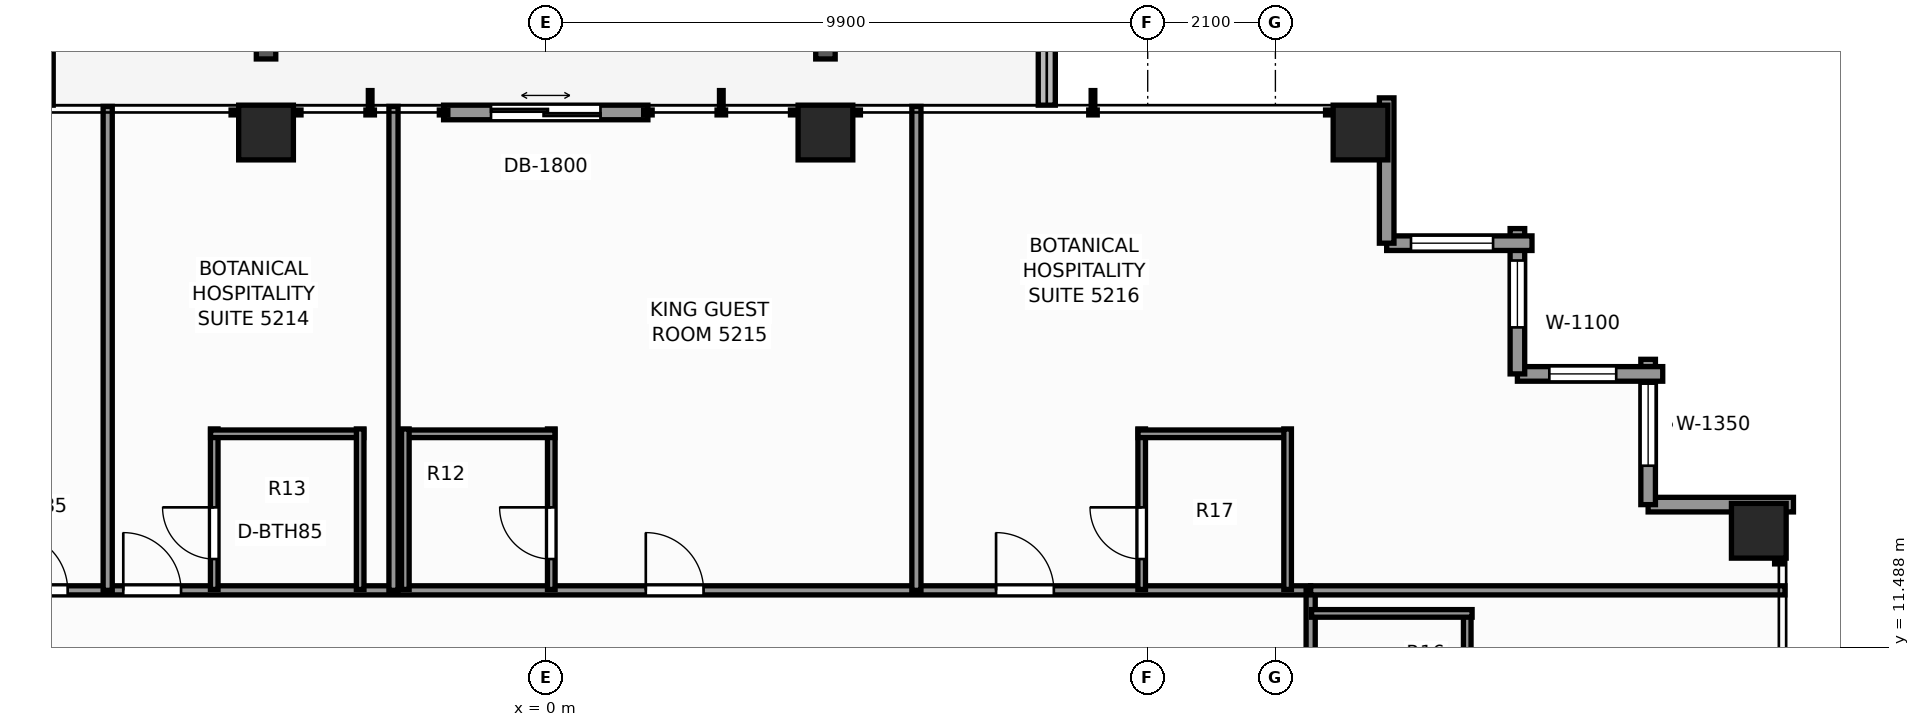
"""IFC4 building model, lengths in metres.
Left out: names, types, materials, properties, quantities, classifications, styles, units other than length and angle.
Written with IfcOpenShell. Run it as: python <this file> out.ifc"""

import sys

from ifc_helpers import new_model, si_unit, direction, frame, frame_2d, origin, origin_2d, place, context, subcontext, project, spatial, rectangle, extrude, element, fill, save


model = new_model("IFC4")
c1 = context("Model", 3, precision=1e-05, world=origin(), true_north=direction((0.0, 1.0)))
c2 = subcontext(c1, "Body", "Model", "MODEL_VIEW")
j1 = project(units=[si_unit("LENGTHUNIT", "METRE"), si_unit("PLANEANGLEUNIT", "RADIAN")], contexts=[c1])
p1 = place(None, origin())
s1 = spatial("IfcSite", under=j1, at=p1, CompositionType="ELEMENT")
p2 = place(p1, origin())
s2 = spatial("IfcBuilding", under=s1, at=p2, CompositionType="ELEMENT")
p3 = place(p2, frame((0.0, 0.0, 180.0)))
s3 = spatial("IfcBuildingStorey", under=s2, at=p3, CompositionType="ELEMENT", Elevation=180.0)
for number, where, z_axis, x_axis in (
    (1, (-4.6, 19.95, 0.0), (0.0, 0.0, 1.0), (1.0, 0.0, 0.0)),
    (2, (4.6, 19.95, 0.0), (0.0, 0.0, 1.0), (1.0, 0.0, 0.0)),
    (3, (13.4, 19.95, 0.0), (0.0, 0.0, 1.0), (1.0, 0.0, 0.0)),
    (4, (19.95, 13.4, 0.0), (0.0, 0.0, 1.0), (1.0, 0.0, 0.0)),
):
    element("IfcColumn", number, at=place(p3, frame(where, z_axis=z_axis, x_axis=x_axis)), inside=s3, PredefinedType="COLUMN", context=c2, shape_type="SweptSolid", body=[
        extrude(rectangle(XDim=0.9, YDim=0.9, at=origin_2d()), origin(), (0.0, 0.0, 1.0), 3.3),
    ])
p4 = place(p3, frame((8.24, 20.4, -0.04), z_axis=(0.0, 0.0, 1.0), x_axis=(0.0, 1.0, 0.0)))
e5 = element("IfcWall", 5, at=p4, inside=s3, PredefinedType="PARAPET", context=c2, shape_type="SweptSolid", body=[
    extrude(rectangle(XDim=3.42, YDim=0.28, at=frame_2d((1.71, 0.0))), origin(), (0.0, 0.0, 1.0), 0.42),
])
p5 = place(p3, frame((-8.24, 23.375, -0.04), z_axis=(0.0, 0.0, 1.0), x_axis=(0.0, -1.0, 0.0)))
e6 = element("IfcWall", 6, at=p5, inside=s3, PredefinedType="PARAPET", context=c2, shape_type="SweptSolid", body=[
    extrude(rectangle(XDim=2.975, YDim=0.28, at=frame_2d((1.487, 0.0))), origin(), (0.0, 0.0, 1.0), 0.42),
])
p6 = place(p3, frame((18.13, 13.83, 0.0), z_axis=(0.0, 0.0, 1.0), x_axis=(1.0, 0.0, 0.0)))
e7 = element("IfcWall", 7, at=p6, inside=s3, PredefinedType="STANDARD", context=c2, shape_type="SweptSolid", body=[
    extrude(rectangle(XDim=2.39, YDim=0.24, at=frame_2d((1.195, 0.0))), origin(), (0.0, 0.0, 1.0), 2.463),
])
p7 = place(p3, frame((18.13, 16.22, 0.0), z_axis=(0.0, 0.0, 1.0), x_axis=(0.0, -1.0, 0.0)))
e8 = element("IfcWall", 8, at=p7, inside=s3, PredefinedType="STANDARD", context=c2, shape_type="SweptSolid", body=[
    extrude(rectangle(XDim=2.39, YDim=0.24, at=frame_2d((1.195, 0.0))), origin(), (0.0, 0.0, 1.0), 2.463),
])
p8 = place(p7, frame((0.4, 0.0, 0.65)))
e9 = element("IfcOpeningElement", 9, at=p8, cuts=e8, PredefinedType="OPENING", context=c2, shape_type="SweptSolid", body=[
    extrude(rectangle(XDim=1.35, YDim=1.55, at=frame_2d((0.675, 0.775))), frame((0.0, 0.13, 0.0), z_axis=(0.0, -1.0, 0.0), x_axis=(1.0, 0.0, 0.0)), (0.0, 0.0, 1.0), 0.26),
])
p9 = place(p3, frame((15.98, 15.98, 0.0), z_axis=(0.0, 0.0, 1.0), x_axis=(1.0, 0.0, 0.0)))
e10 = element("IfcWall", 10, at=p9, inside=s3, PredefinedType="STANDARD", context=c2, shape_type="SweptSolid", body=[
    extrude(rectangle(XDim=2.39, YDim=0.24, at=frame_2d((1.195, 0.0))), origin(), (0.0, 0.0, 1.0), 2.463),
])
p10 = place(p9, frame((0.525, 0.0, 0.65)))
e11 = element("IfcOpeningElement", 11, at=p10, cuts=e10, PredefinedType="OPENING", context=c2, shape_type="SweptSolid", body=[
    extrude(rectangle(XDim=1.1, YDim=1.45, at=frame_2d((0.55, 0.725))), frame((0.0, 0.13, 0.0), z_axis=(0.0, -1.0, 0.0), x_axis=(1.0, 0.0, 0.0)), (0.0, 0.0, 1.0), 0.26),
])
p11 = place(p3, frame((15.98, 18.37, 0.0), z_axis=(0.0, 0.0, 1.0), x_axis=(0.0, -1.0, 0.0)))
e12 = element("IfcWall", 12, at=p11, inside=s3, PredefinedType="STANDARD", context=c2, shape_type="SweptSolid", body=[
    extrude(rectangle(XDim=2.39, YDim=0.24, at=frame_2d((1.195, 0.0))), origin(), (0.0, 0.0, 1.0), 2.463),
])
p12 = place(p11, frame((0.525, 0.0, 0.65)))
e13 = element("IfcOpeningElement", 13, at=p12, cuts=e12, PredefinedType="OPENING", context=c2, shape_type="SweptSolid", body=[
    extrude(rectangle(XDim=1.1, YDim=1.45, at=frame_2d((0.55, 0.725))), frame((0.0, 0.13, 0.0), z_axis=(0.0, -1.0, 0.0), x_axis=(1.0, 0.0, 0.0)), (0.0, 0.0, 1.0), 0.26),
])
p13 = place(p3, frame((13.83, 18.13, 0.0), z_axis=(0.0, 0.0, 1.0), x_axis=(1.0, 0.0, 0.0)))
e14 = element("IfcWall", 14, at=p13, inside=s3, PredefinedType="STANDARD", context=c2, shape_type="SweptSolid", body=[
    extrude(rectangle(XDim=2.39, YDim=0.24, at=frame_2d((1.195, 0.0))), origin(), (0.0, 0.0, 1.0), 2.463),
])
p14 = place(p13, frame((0.4, 0.0, 0.65)))
e15 = element("IfcOpeningElement", 15, at=p14, cuts=e14, PredefinedType="OPENING", context=c2, shape_type="SweptSolid", body=[
    extrude(rectangle(XDim=1.35, YDim=1.55, at=frame_2d((0.675, 0.775))), frame((0.0, 0.13, 0.0), z_axis=(0.0, -1.0, 0.0), x_axis=(1.0, 0.0, 0.0)), (0.0, 0.0, 1.0), 0.26),
])
p15 = place(p3, frame((13.83, 20.52, 0.0), z_axis=(0.0, 0.0, 1.0), x_axis=(0.0, -1.0, 0.0)))
e16 = element("IfcWall", 16, at=p15, inside=s3, PredefinedType="STANDARD", context=c2, shape_type="SweptSolid", body=[
    extrude(rectangle(XDim=2.39, YDim=0.24, at=frame_2d((1.195, 0.0))), origin(), (0.0, 0.0, 1.0), 2.463),
])
p16 = place(p3, frame((-1.68, 20.28, 0.0), z_axis=(0.0, 0.0, 1.0), x_axis=(1.0, 0.0, 0.0)))
e17 = element("IfcWall", 17, at=p16, inside=s3, PredefinedType="STANDARD", context=c2, shape_type="SweptSolid", body=[
    extrude(rectangle(XDim=3.36, YDim=0.24, at=frame_2d((1.68, 0.0))), origin(), (0.0, 0.0, 1.0), 3.08),
])
p17 = place(p16, frame((0.78, 0.0, 0.0)))
e18 = element("IfcOpeningElement", 18, at=p17, cuts=e17, PredefinedType="OPENING", context=c2, shape_type="SweptSolid", body=[
    extrude(rectangle(XDim=1.8, YDim=2.2, at=frame_2d((0.9, 1.1))), frame((0.0, 0.13, 0.0), z_axis=(0.0, -1.0, 0.0), x_axis=(1.0, 0.0, 0.0)), (0.0, 0.0, 1.0), 0.26),
])
p18 = place(p3, frame((-12.26, 12.42, 0.0), z_axis=(0.0, 0.0, 1.0), x_axis=(1.0, 0.0, 0.0)))
e19 = element("IfcWall", 19, at=p18, inside=s3, PredefinedType="PARTITIONING", context=c2, shape_type="SweptSolid", body=[
    extrude(rectangle(XDim=24.84, YDim=0.15, at=frame_2d((12.42, 0.0))), origin(), (0.0, 0.0, 1.0), 2.369),
])
p19 = place(p18, frame((3.448, 0.0, 0.0)))
e20 = element("IfcOpeningElement", 20, at=p19, cuts=e19, PredefinedType="OPENING", context=c2, shape_type="SweptSolid", body=[
    extrude(rectangle(XDim=0.95, YDim=2.06, at=frame_2d((0.475, 1.03))), frame((0.0, 0.085, 0.0), z_axis=(0.0, -1.0, 0.0), x_axis=(1.0, 0.0, 0.0)), (0.0, 0.0, 1.0), 0.17),
])
p20 = place(p18, frame((5.312, 0.0, 0.0)))
e21 = element("IfcOpeningElement", 21, at=p20, cuts=e19, PredefinedType="OPENING", context=c2, shape_type="SweptSolid", body=[
    extrude(rectangle(XDim=0.95, YDim=2.06, at=frame_2d((0.475, 1.03))), frame((0.0, 0.085, 0.0), z_axis=(0.0, -1.0, 0.0), x_axis=(1.0, 0.0, 0.0)), (0.0, 0.0, 1.0), 0.17),
])
p21 = place(p18, frame((13.906, 0.0, 0.0)))
e22 = element("IfcOpeningElement", 22, at=p21, cuts=e19, PredefinedType="OPENING", context=c2, shape_type="SweptSolid", body=[
    extrude(rectangle(XDim=0.95, YDim=2.06, at=frame_2d((0.475, 1.03))), frame((0.0, 0.085, 0.0), z_axis=(0.0, -1.0, 0.0), x_axis=(1.0, 0.0, 0.0)), (0.0, 0.0, 1.0), 0.17),
])
p22 = place(p18, frame((19.666, 0.0, 0.0)))
e23 = element("IfcOpeningElement", 23, at=p22, cuts=e19, PredefinedType="OPENING", context=c2, shape_type="SweptSolid", body=[
    extrude(rectangle(XDim=0.95, YDim=2.06, at=frame_2d((0.475, 1.03))), frame((0.0, 0.085, 0.0), z_axis=(0.0, -1.0, 0.0), x_axis=(1.0, 0.0, 0.0)), (0.0, 0.0, 1.0), 0.17),
])
p23 = place(p3, frame((12.58, -12.42, 0.0), z_axis=(0.0, 0.0, 1.0), x_axis=(0.0, 1.0, 0.0)))
e24 = element("IfcWall", 24, at=p23, inside=s3, PredefinedType="PARTITIONING", context=c2, shape_type="SweptSolid", body=[
    extrude(rectangle(XDim=24.84, YDim=0.15, at=frame_2d((12.42, 0.0))), origin(), (0.0, 0.0, 1.0), 2.369),
])
p24 = place(p23, frame((3.024, 0.0, 0.0)))
e25 = element("IfcOpeningElement", 25, at=p24, cuts=e24, PredefinedType="OPENING", context=c2, shape_type="SweptSolid", body=[
    extrude(rectangle(XDim=0.9, YDim=2.06, at=frame_2d((0.45, 1.03))), frame((0.0, 0.085, 0.0), z_axis=(0.0, -1.0, 0.0), x_axis=(1.0, 0.0, 0.0)), (0.0, 0.0, 1.0), 0.17),
])
p25 = place(p23, frame((5.359, 0.0, 0.0)))
e26 = element("IfcOpeningElement", 26, at=p25, cuts=e24, PredefinedType="OPENING", context=c2, shape_type="SweptSolid", body=[
    extrude(rectangle(XDim=0.9, YDim=2.06, at=frame_2d((0.45, 1.03))), frame((0.0, 0.085, 0.0), z_axis=(0.0, -1.0, 0.0), x_axis=(1.0, 0.0, 0.0)), (0.0, 0.0, 1.0), 0.17),
])
p26 = place(p23, frame((11.067, 0.0, 0.0)))
e27 = element("IfcOpeningElement", 27, at=p26, cuts=e24, PredefinedType="OPENING", context=c2, shape_type="SweptSolid", body=[
    extrude(rectangle(XDim=0.95, YDim=2.06, at=frame_2d((0.475, 1.03))), frame((0.0, 0.085, 0.0), z_axis=(0.0, -1.0, 0.0), x_axis=(1.0, 0.0, 0.0)), (0.0, 0.0, 1.0), 0.17),
])
p27 = place(p23, frame((18.038, 0.0, 0.0)))
e28 = element("IfcOpeningElement", 28, at=p27, cuts=e24, PredefinedType="OPENING", context=c2, shape_type="SweptSolid", body=[
    extrude(rectangle(XDim=0.95, YDim=2.06, at=frame_2d((0.475, 1.03))), frame((0.0, 0.085, 0.0), z_axis=(0.0, -1.0, 0.0), x_axis=(1.0, 0.0, 0.0)), (0.0, 0.0, 1.0), 0.17),
])
p28 = place(p23, frame((20.184, 0.0, 0.0)))
e29 = element("IfcOpeningElement", 29, at=p28, cuts=e24, PredefinedType="OPENING", context=c2, shape_type="SweptSolid", body=[
    extrude(rectangle(XDim=0.95, YDim=2.06, at=frame_2d((0.475, 1.03))), frame((0.0, 0.085, 0.0), z_axis=(0.0, -1.0, 0.0), x_axis=(1.0, 0.0, 0.0)), (0.0, 0.0, 1.0), 0.17),
])
p29 = place(p3, frame((12.58, 12.42, 0.0), z_axis=(0.0, 0.0, 1.0), x_axis=(1.0, 0.0, 0.0)))
e30 = element("IfcWall", 30, at=p29, inside=s3, PredefinedType="PARTITIONING", context=c2, shape_type="SweptSolid", body=[
    extrude(rectangle(XDim=7.8, YDim=0.15, at=frame_2d((3.9, 0.0))), origin(), (0.0, 0.0, 1.0), 2.369),
])
p30 = place(p3, frame((15.155, 9.581, 0.0), z_axis=(0.0, 0.0, 1.0), x_axis=(0.0, 1.0, 0.0)))
e31 = element("IfcWall", 31, at=p30, inside=s3, PredefinedType="PARTITIONING", context=c2, shape_type="SweptSolid", body=[
    extrude(rectangle(XDim=2.52, YDim=0.125, at=frame_2d((1.26, 0.0))), origin(), (0.0, 0.0, 1.0), 2.369),
])
p31 = place(p3, frame((12.595, 12.041, 0.0), z_axis=(0.0, 0.0, 1.0), x_axis=(1.0, 0.0, 0.0)))
e32 = element("IfcWall", 32, at=p31, inside=s3, PredefinedType="PARTITIONING", context=c2, shape_type="SweptSolid", body=[
    extrude(rectangle(XDim=2.64, YDim=0.125, at=frame_2d((1.32, 0.0))), origin(), (0.0, 0.0, 1.0), 3.08),
])
for number, where, z_axis, x_axis in (
    (33, (-7.204, 12.42, 0.0), (0.0, 0.0, 1.0), (0.0, 1.0, 0.0)),
    (34, (-2.504, 12.42, 0.0), (0.0, 0.0, 1.0), (0.0, 1.0, 0.0)),
):
    element("IfcWall", number, at=place(p3, frame(where, z_axis=z_axis, x_axis=x_axis)), inside=s3, PredefinedType="PARTITIONING", context=c2, shape_type="SweptSolid", body=[
        extrude(rectangle(XDim=7.96, YDim=0.15, at=frame_2d((3.98, 0.0))), origin(), (0.0, 0.0, 1.0), 2.453),
    ])
p32 = place(p3, frame((-5.452, 12.435, 0.0), z_axis=(0.0, 0.0, 1.0), x_axis=(0.0, 1.0, 0.0)))
e35 = element("IfcWall", 35, at=p32, inside=s3, PredefinedType="PARTITIONING", context=c2, shape_type="SweptSolid", body=[
    extrude(rectangle(XDim=2.64, YDim=0.125, at=frame_2d((1.32, 0.0))), origin(), (0.0, 0.0, 1.0), 3.08),
])
p33 = place(p32, frame((0.5, 0.0, 0.0)))
e36 = element("IfcOpeningElement", 36, at=p33, cuts=e35, PredefinedType="OPENING", context=c2, shape_type="SweptSolid", body=[
    extrude(rectangle(XDim=0.85, YDim=2.03, at=frame_2d((0.425, 1.015))), frame((0.0, 0.073, 0.0), z_axis=(0.0, -1.0, 0.0), x_axis=(1.0, 0.0, 0.0)), (0.0, 0.0, 1.0), 0.145),
])
p34 = place(p3, frame((-5.512, 14.995, 0.0), z_axis=(0.0, 0.0, 1.0), x_axis=(1.0, 0.0, 0.0)))
e37 = element("IfcWall", 37, at=p34, inside=s3, PredefinedType="PARTITIONING", context=c2, shape_type="SweptSolid", body=[
    extrude(rectangle(XDim=2.52, YDim=0.125, at=frame_2d((1.26, 0.0))), origin(), (0.0, 0.0, 1.0), 2.369),
])
p35 = place(p3, frame((-3.052, 12.435, 0.0), z_axis=(0.0, 0.0, 1.0), x_axis=(0.0, 1.0, 0.0)))
e38 = element("IfcWall", 38, at=p35, inside=s3, PredefinedType="PARTITIONING", context=c2, shape_type="SweptSolid", body=[
    extrude(rectangle(XDim=2.64, YDim=0.125, at=frame_2d((1.32, 0.0))), origin(), (0.0, 0.0, 1.0), 3.08),
])
p36 = place(p3, frame((6.096, 12.42, 0.0), z_axis=(0.0, 0.0, 1.0), x_axis=(0.0, 1.0, 0.0)))
e39 = element("IfcWall", 39, at=p36, inside=s3, PredefinedType="PARTITIONING", context=c2, shape_type="SweptSolid", body=[
    extrude(rectangle(XDim=7.96, YDim=0.15, at=frame_2d((3.98, 0.0))), origin(), (0.0, 0.0, 1.0), 2.453),
])
p37 = place(p3, frame((0.091, 12.435, 0.0), z_axis=(0.0, 0.0, 1.0), x_axis=(0.0, 1.0, 0.0)))
e40 = element("IfcWall", 40, at=p37, inside=s3, PredefinedType="PARTITIONING", context=c2, shape_type="SweptSolid", body=[
    extrude(rectangle(XDim=2.64, YDim=0.125, at=frame_2d((1.32, 0.0))), origin(), (0.0, 0.0, 1.0), 2.605),
])
p38 = place(p37, frame((0.5, 0.0, 0.0)))
e41 = element("IfcOpeningElement", 41, at=p38, cuts=e40, PredefinedType="OPENING", context=c2, shape_type="SweptSolid", body=[
    extrude(rectangle(XDim=0.85, YDim=2.03, at=frame_2d((0.425, 1.015))), frame((0.0, 0.073, 0.0), z_axis=(0.0, -1.0, 0.0), x_axis=(1.0, 0.0, 0.0)), (0.0, 0.0, 1.0), 0.145),
])
p39 = place(p3, frame((-2.369, 14.995, 0.0), z_axis=(0.0, 0.0, 1.0), x_axis=(1.0, 0.0, 0.0)))
e42 = element("IfcWall", 42, at=p39, inside=s3, PredefinedType="PARTITIONING", context=c2, shape_type="SweptSolid", body=[
    extrude(rectangle(XDim=2.52, YDim=0.125, at=frame_2d((1.26, 0.0))), origin(), (0.0, 0.0, 1.0), 2.605),
])
p40 = place(p3, frame((-2.309, 12.435, 0.0), z_axis=(0.0, 0.0, 1.0), x_axis=(0.0, 1.0, 0.0)))
e43 = element("IfcWall", 43, at=p40, inside=s3, PredefinedType="PARTITIONING", context=c2, shape_type="SweptSolid", body=[
    extrude(rectangle(XDim=2.64, YDim=0.125, at=frame_2d((1.32, 0.0))), origin(), (0.0, 0.0, 1.0), 3.08),
])
p41 = place(p3, frame((9.801, 12.435, 0.0), z_axis=(0.0, 0.0, 1.0), x_axis=(0.0, 1.0, 0.0)))
e44 = element("IfcWall", 44, at=p41, inside=s3, PredefinedType="PARTITIONING", context=c2, shape_type="SweptSolid", body=[
    extrude(rectangle(XDim=2.64, YDim=0.125, at=frame_2d((1.32, 0.0))), origin(), (0.0, 0.0, 1.0), 3.08),
])
p42 = place(p41, frame((0.5, 0.0, 0.0)))
e45 = element("IfcOpeningElement", 45, at=p42, cuts=e44, PredefinedType="OPENING", context=c2, shape_type="SweptSolid", body=[
    extrude(rectangle(XDim=0.85, YDim=2.03, at=frame_2d((0.425, 1.015))), frame((0.0, 0.073, 0.0), z_axis=(0.0, -1.0, 0.0), x_axis=(1.0, 0.0, 0.0)), (0.0, 0.0, 1.0), 0.145),
])
p43 = place(p3, frame((9.741, 14.995, 0.0), z_axis=(0.0, 0.0, 1.0), x_axis=(1.0, 0.0, 0.0)))
e46 = element("IfcWall", 46, at=p43, inside=s3, PredefinedType="PARTITIONING", context=c2, shape_type="SweptSolid", body=[
    extrude(rectangle(XDim=2.52, YDim=0.125, at=frame_2d((1.26, 0.0))), origin(), (0.0, 0.0, 1.0), 2.369),
])
p44 = place(p3, frame((12.201, 12.435, 0.0), z_axis=(0.0, 0.0, 1.0), x_axis=(0.0, 1.0, 0.0)))
e47 = element("IfcWall", 47, at=p44, inside=s3, PredefinedType="PARTITIONING", context=c2, shape_type="SweptSolid", body=[
    extrude(rectangle(XDim=2.64, YDim=0.125, at=frame_2d((1.32, 0.0))), origin(), (0.0, 0.0, 1.0), 3.08),
])
p45 = place(p8, origin())
e48 = element("IfcWindow", 48, at=p45, inside=s3, PartitioningType="SINGLE_PANEL", PredefinedType="WINDOW", context=c2, shape_type="SweptSolid", body=[
    extrude(rectangle(XDim=1.35, YDim=1.55, at=frame_2d((0.675, 0.775))), frame((0.0, 0.03, 0.0), z_axis=(0.0, -1.0, 0.0), x_axis=(1.0, 0.0, 0.0)), (0.0, 0.0, 1.0), 0.06),
])
fill(e9, e48)
p46 = place(p10, origin())
e49 = element("IfcWindow", 49, at=p46, inside=s3, PartitioningType="SINGLE_PANEL", PredefinedType="WINDOW", context=c2, shape_type="SweptSolid", body=[
    extrude(rectangle(XDim=1.1, YDim=1.45, at=frame_2d((0.55, 0.725))), frame((0.0, 0.03, 0.0), z_axis=(0.0, -1.0, 0.0), x_axis=(1.0, 0.0, 0.0)), (0.0, 0.0, 1.0), 0.06),
])
fill(e11, e49)
p47 = place(p12, origin())
e50 = element("IfcWindow", 50, at=p47, inside=s3, PartitioningType="SINGLE_PANEL", PredefinedType="WINDOW", context=c2, shape_type="SweptSolid", body=[
    extrude(rectangle(XDim=1.1, YDim=1.45, at=frame_2d((0.55, 0.725))), frame((0.0, 0.03, 0.0), z_axis=(0.0, -1.0, 0.0), x_axis=(1.0, 0.0, 0.0)), (0.0, 0.0, 1.0), 0.06),
])
fill(e13, e50)
p48 = place(p14, origin())
e51 = element("IfcWindow", 51, at=p48, inside=s3, PartitioningType="SINGLE_PANEL", PredefinedType="WINDOW", context=c2, shape_type="SweptSolid", body=[
    extrude(rectangle(XDim=1.35, YDim=1.55, at=frame_2d((0.675, 0.775))), frame((0.0, 0.03, 0.0), z_axis=(0.0, -1.0, 0.0), x_axis=(1.0, 0.0, 0.0)), (0.0, 0.0, 1.0), 0.06),
])
fill(e15, e51)
p49 = place(p17, origin())
e52 = element("IfcDoor", 52, at=p49, inside=s3, OperationType="DOUBLE_DOOR_SLIDING", PredefinedType="DOOR", context=c2, shape_type="SweptSolid", body=[
    extrude(rectangle(XDim=1.8, YDim=2.2, at=frame_2d((0.9, 1.1))), frame((0.0, 0.025, 0.0), z_axis=(0.0, -1.0, 0.0), x_axis=(1.0, 0.0, 0.0)), (0.0, 0.0, 1.0), 0.05),
])
fill(e18, e52)
p50 = place(p19, origin())
e53 = element("IfcDoor", 53, at=p50, inside=s3, OperationType="SINGLE_SWING_LEFT", PredefinedType="DOOR", context=c2, shape_type="SweptSolid", body=[
    extrude(rectangle(XDim=0.95, YDim=2.06, at=frame_2d((0.475, 1.03))), frame((0.0, 0.025, 0.0), z_axis=(0.0, -1.0, 0.0), x_axis=(1.0, 0.0, 0.0)), (0.0, 0.0, 1.0), 0.05),
])
fill(e20, e53)
p51 = place(p33, origin())
e54 = element("IfcDoor", 54, at=p51, inside=s3, OperationType="SINGLE_SWING_RIGHT", PredefinedType="DOOR", context=c2, shape_type="SweptSolid", body=[
    extrude(rectangle(XDim=0.85, YDim=2.03, at=frame_2d((0.425, 1.015))), frame((0.0, 0.025, 0.0), z_axis=(0.0, -1.0, 0.0), x_axis=(1.0, 0.0, 0.0)), (0.0, 0.0, 1.0), 0.05),
])
fill(e36, e54)
p52 = place(p20, origin())
e55 = element("IfcDoor", 55, at=p52, inside=s3, OperationType="SINGLE_SWING_LEFT", PredefinedType="DOOR", context=c2, shape_type="SweptSolid", body=[
    extrude(rectangle(XDim=0.95, YDim=2.06, at=frame_2d((0.475, 1.03))), frame((0.0, 0.025, 0.0), z_axis=(0.0, -1.0, 0.0), x_axis=(1.0, 0.0, 0.0)), (0.0, 0.0, 1.0), 0.05),
])
fill(e21, e55)
p53 = place(p38, origin())
e56 = element("IfcDoor", 56, at=p53, inside=s3, OperationType="SINGLE_SWING_RIGHT", PredefinedType="DOOR", context=c2, shape_type="SweptSolid", body=[
    extrude(rectangle(XDim=0.85, YDim=2.03, at=frame_2d((0.425, 1.015))), frame((0.0, 0.025, 0.0), z_axis=(0.0, -1.0, 0.0), x_axis=(1.0, 0.0, 0.0)), (0.0, 0.0, 1.0), 0.05),
])
fill(e41, e56)
p54 = place(p21, origin())
e57 = element("IfcDoor", 57, at=p54, inside=s3, OperationType="SINGLE_SWING_LEFT", PredefinedType="DOOR", context=c2, shape_type="SweptSolid", body=[
    extrude(rectangle(XDim=0.95, YDim=2.06, at=frame_2d((0.475, 1.03))), frame((0.0, 0.025, 0.0), z_axis=(0.0, -1.0, 0.0), x_axis=(1.0, 0.0, 0.0)), (0.0, 0.0, 1.0), 0.05),
])
fill(e22, e57)
p55 = place(p42, origin())
e58 = element("IfcDoor", 58, at=p55, inside=s3, OperationType="SINGLE_SWING_RIGHT", PredefinedType="DOOR", context=c2, shape_type="SweptSolid", body=[
    extrude(rectangle(XDim=0.85, YDim=2.03, at=frame_2d((0.425, 1.015))), frame((0.0, 0.025, 0.0), z_axis=(0.0, -1.0, 0.0), x_axis=(1.0, 0.0, 0.0)), (0.0, 0.0, 1.0), 0.05),
])
fill(e45, e58)
p56 = place(p22, origin())
e59 = element("IfcDoor", 59, at=p56, inside=s3, OperationType="SINGLE_SWING_LEFT", PredefinedType="DOOR", context=c2, shape_type="SweptSolid", body=[
    extrude(rectangle(XDim=0.95, YDim=2.06, at=frame_2d((0.475, 1.03))), frame((0.0, 0.025, 0.0), z_axis=(0.0, -1.0, 0.0), x_axis=(1.0, 0.0, 0.0)), (0.0, 0.0, 1.0), 0.05),
])
fill(e23, e59)
save(model, sys.argv[1])
